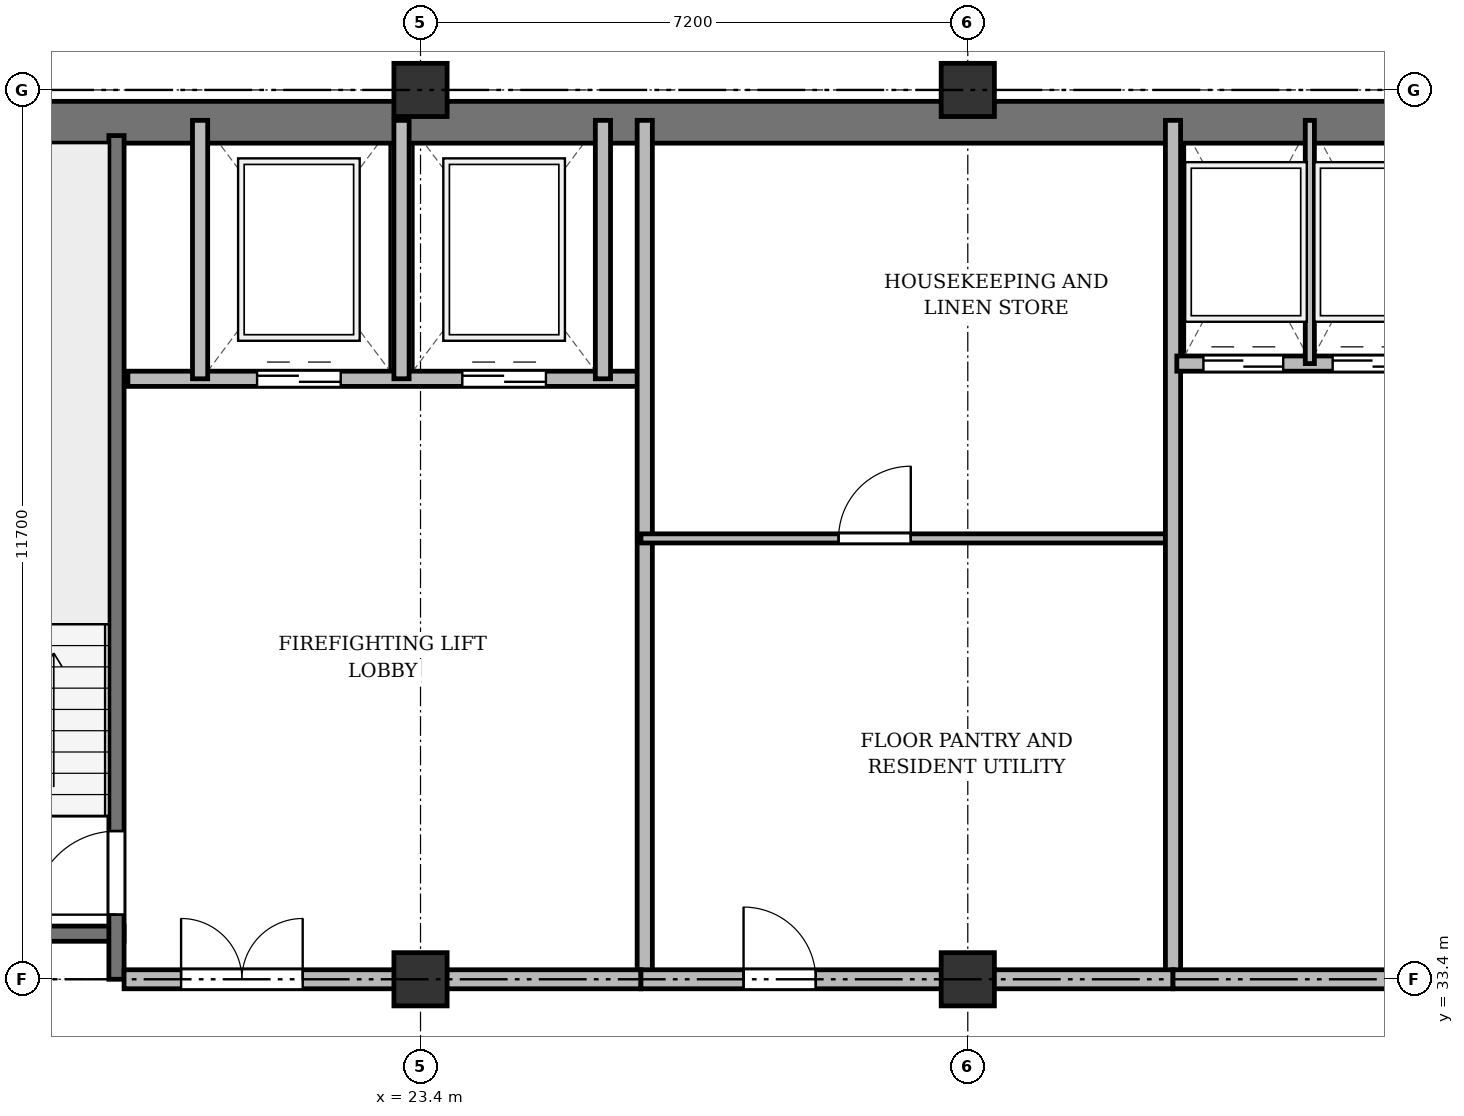
"""IFC4 building model, lengths in metres.
Left out: names, types, materials, properties, quantities, classifications, styles, units other than length and angle.
Written with IfcOpenShell. Run it as: python <this file> out.ifc"""

import sys

from ifc_helpers import new_model, si_unit, direction, frame, frame_2d, origin, origin_2d, place, context, subcontext, project, spatial, rectangle, extrude, source, transform, mapped, element, fill, save


model = new_model("IFC4")
c1 = context("Model", 3, precision=1e-05, world=origin(), true_north=direction((0.0, 1.0)))
c2 = subcontext(c1, "Body", "Model", "MODEL_VIEW")
j1 = project(units=[si_unit("LENGTHUNIT", "METRE"), si_unit("PLANEANGLEUNIT", "RADIAN")], contexts=[c1])
p1 = place(None, origin())
s1 = spatial("IfcSite", under=j1, at=p1, CompositionType="ELEMENT")
p2 = place(p1, origin())
s2 = spatial("IfcBuilding", under=s1, at=p2, CompositionType="ELEMENT")
p3 = place(p2, frame((0.0, 0.0, 204.9)))
s3 = spatial("IfcBuildingStorey", under=s2, at=p3, CompositionType="ELEMENT", Elevation=204.9)
m1 = source(origin(), c2, "Body", "SweptSolid", [
    extrude(rectangle(XDim=0.7, YDim=0.7, at=origin_2d()), origin(), (0.0, 0.0, 1.0), 3.6),
])
for number, where, z_axis, x_axis in (
    (1, (23.4, 33.4, 0.0), (0.0, 0.0, 1.0), (1.0, 0.0, 0.0)),
    (2, (23.4, 45.1, 0.0), (0.0, 0.0, 1.0), (1.0, 0.0, 0.0)),
    (3, (30.6, 33.4, 0.0), (0.0, 0.0, 1.0), (1.0, 0.0, 0.0)),
    (4, (30.6, 45.1, 0.0), (0.0, 0.0, 1.0), (1.0, 0.0, 0.0)),
):
    element("IfcColumn", number, at=place(p3, frame(where, z_axis=z_axis, x_axis=x_axis)), inside=s3, PredefinedType="COLUMN", context=c2, shape_type="MappedRepresentation", body=[
        mapped(m1, transform((0.0, 0.0, 0.0), x_axis=(1.0, 0.0, 0.0), y_axis=(0.0, 1.0, 0.0), z_axis=(0.0, 0.0, 1.0), scale=1.0)),
    ])
p4 = place(p3, frame((15.65, 44.675, 0.0), z_axis=(0.0, 0.0, 1.0), x_axis=(1.0, 0.0, 0.0)))
e5 = element("IfcWall", 5, at=p4, inside=s3, PredefinedType="SHEAR", context=c2, shape_type="SweptSolid", body=[
    extrude(rectangle(XDim=43.1, YDim=0.55, at=frame_2d((21.55, 0.0))), origin(), (0.0, 0.0, 1.0), 3.36),
])
p5 = place(p3, frame((16.1, 34.0, 0.0), z_axis=(0.0, 0.0, 1.0), x_axis=(1.0, 0.0, 0.0)))
e6 = element("IfcWall", 6, at=p5, inside=s3, PredefinedType="SHEAR", context=c2, shape_type="SweptSolid", body=[
    extrude(rectangle(XDim=3.4, YDim=0.2, at=frame_2d((1.7, 0.0))), origin(), (0.0, 0.0, 1.0), 3.36),
])
p6 = place(p3, frame((19.4, 33.4, 0.0), z_axis=(0.0, 0.0, 1.0), x_axis=(0.0, 1.0, 0.0)))
e7 = element("IfcWall", 7, at=p6, inside=s3, PredefinedType="SHEAR", context=c2, shape_type="SweptSolid", body=[
    extrude(rectangle(XDim=11.1, YDim=0.2, at=frame_2d((5.55, 0.0))), origin(), (0.0, 0.0, 1.0), 3.36),
])
p7 = place(p6, frame((0.85, 0.0, 0.0)))
e8 = element("IfcOpeningElement", 8, at=p7, cuts=e7, PredefinedType="OPENING", context=c2, shape_type="SweptSolid", body=[
    extrude(rectangle(XDim=1.1, YDim=2.15, at=frame_2d((0.55, 1.075))), frame((0.0, 0.11, 0.0), z_axis=(0.0, -1.0, 0.0), x_axis=(1.0, 0.0, 0.0)), (0.0, 0.0, 1.0), 0.22),
])
p8 = place(p3, frame((19.55, 41.3, 0.0), z_axis=(0.0, 0.0, 1.0), x_axis=(1.0, 0.0, 0.0)))
e9 = element("IfcWall", 9, at=p8, inside=s3, PredefinedType="SOLIDWALL", context=c2, shape_type="SweptSolid", body=[
    extrude(rectangle(XDim=6.75, YDim=0.2, at=frame_2d((3.375, 0.0))), origin(), (0.0, 0.0, 1.0), 3.36),
])
p9 = place(p8, frame((1.7, 0.0, 0.0)))
e10 = element("IfcOpeningElement", 10, at=p9, cuts=e9, PredefinedType="OPENING", context=c2, shape_type="SweptSolid", body=[
    extrude(rectangle(XDim=1.1, YDim=2.15, at=frame_2d((0.55, 1.075))), frame((0.0, 0.11, 0.0), z_axis=(0.0, -1.0, 0.0), x_axis=(1.0, 0.0, 0.0)), (0.0, 0.0, 1.0), 0.22),
])
p10 = place(p8, frame((4.4, 0.0, 0.0)))
e11 = element("IfcOpeningElement", 11, at=p10, cuts=e9, PredefinedType="OPENING", context=c2, shape_type="SweptSolid", body=[
    extrude(rectangle(XDim=1.1, YDim=2.15, at=frame_2d((0.55, 1.075))), frame((0.0, 0.11, 0.0), z_axis=(0.0, -1.0, 0.0), x_axis=(1.0, 0.0, 0.0)), (0.0, 0.0, 1.0), 0.22),
])
for number, where, z_axis, x_axis in (
    (12, (20.5, 41.3, 0.0), (0.0, 0.0, 1.0), (0.0, 1.0, 0.0)),
    (13, (23.15, 41.3, 0.0), (0.0, 0.0, 1.0), (0.0, 1.0, 0.0)),
    (14, (25.8, 41.3, 0.0), (0.0, 0.0, 1.0), (0.0, 1.0, 0.0)),
):
    element("IfcWall", number, at=place(p3, frame(where, z_axis=z_axis, x_axis=x_axis)), inside=s3, PredefinedType="SOLIDWALL", context=c2, shape_type="SweptSolid", body=[
        extrude(rectangle(XDim=3.4, YDim=0.2, at=frame_2d((1.7, 0.0))), origin(), (0.0, 0.0, 1.0), 3.36),
    ])
p11 = place(p3, frame((26.35, 33.4, 0.0), z_axis=(0.0, 0.0, 1.0), x_axis=(0.0, 1.0, 0.0)))
e15 = element("IfcWall", 15, at=p11, inside=s3, PredefinedType="SOLIDWALL", context=c2, shape_type="SweptSolid", body=[
    extrude(rectangle(XDim=11.3, YDim=0.2, at=frame_2d((5.65, 0.0))), origin(), (0.0, 0.0, 1.0), 2.91),
])
p12 = place(p3, frame((19.5, 33.4, 0.0), z_axis=(0.0, 0.0, 1.0), x_axis=(1.0, 0.0, 0.0)))
e16 = element("IfcWall", 16, at=p12, inside=s3, PredefinedType="PARTITIONING", context=c2, shape_type="SweptSolid", body=[
    extrude(rectangle(XDim=6.8, YDim=0.25, at=frame_2d((3.4, 0.0))), origin(), (0.0, 0.0, 1.0), 2.91),
])
p13 = place(p12, frame((0.75, 0.0, 0.0)))
e17 = element("IfcOpeningElement", 17, at=p13, cuts=e16, PredefinedType="OPENING", context=c2, shape_type="SweptSolid", body=[
    extrude(rectangle(XDim=1.6, YDim=2.2, at=frame_2d((0.8, 1.1))), frame((0.0, 0.135, 0.0), z_axis=(0.0, -1.0, 0.0), x_axis=(1.0, 0.0, 0.0)), (0.0, 0.0, 1.0), 0.27),
])
p14 = place(p3, frame((26.3, 39.2, 0.0), z_axis=(0.0, 0.0, 1.0), x_axis=(1.0, 0.0, 0.0)))
e18 = element("IfcWall", 18, at=p14, inside=s3, PredefinedType="PARTITIONING", context=c2, shape_type="SweptSolid", body=[
    extrude(rectangle(XDim=7.0, YDim=0.12, at=frame_2d((3.5, 0.0))), origin(), (0.0, 0.0, 1.0), 2.86),
])
p15 = place(p14, frame((2.6, 0.0, 0.0)))
e19 = element("IfcOpeningElement", 19, at=p15, cuts=e18, PredefinedType="OPENING", context=c2, shape_type="SweptSolid", body=[
    extrude(rectangle(XDim=0.95, YDim=2.15, at=frame_2d((0.475, 1.075))), frame((0.0, 0.07, 0.0), z_axis=(0.0, -1.0, 0.0), x_axis=(1.0, 0.0, 0.0)), (0.0, 0.0, 1.0), 0.14),
])
p16 = place(p3, frame((33.3, 33.4, 0.0), z_axis=(0.0, 0.0, 1.0), x_axis=(0.0, 1.0, 0.0)))
e20 = element("IfcWall", 20, at=p16, inside=s3, PredefinedType="SOLIDWALL", context=c2, shape_type="SweptSolid", body=[
    extrude(rectangle(XDim=11.3, YDim=0.2, at=frame_2d((5.65, 0.0))), origin(), (0.0, 0.0, 1.0), 2.91),
])
p17 = place(p3, frame((33.35, 41.5, 0.0), z_axis=(0.0, 0.0, 1.0), x_axis=(1.0, 0.0, 0.0)))
e21 = element("IfcWall", 21, at=p17, inside=s3, PredefinedType="SOLIDWALL", context=c2, shape_type="SweptSolid", body=[
    extrude(rectangle(XDim=6.9, YDim=0.2, at=frame_2d((3.45, 0.0))), origin(), (0.0, 0.0, 1.0), 3.36),
])
p18 = place(p17, frame((0.35, 0.0, 0.0)))
e22 = element("IfcOpeningElement", 22, at=p18, cuts=e21, PredefinedType="OPENING", context=c2, shape_type="SweptSolid", body=[
    extrude(rectangle(XDim=1.05, YDim=2.15, at=frame_2d((0.525, 1.075))), frame((0.0, 0.11, 0.0), z_axis=(0.0, -1.0, 0.0), x_axis=(1.0, 0.0, 0.0)), (0.0, 0.0, 1.0), 0.22),
])
p19 = place(p17, frame((2.05, 0.0, 0.0)))
e23 = element("IfcOpeningElement", 23, at=p19, cuts=e21, PredefinedType="OPENING", context=c2, shape_type="SweptSolid", body=[
    extrude(rectangle(XDim=1.05, YDim=2.15, at=frame_2d((0.525, 1.075))), frame((0.0, 0.11, 0.0), z_axis=(0.0, -1.0, 0.0), x_axis=(1.0, 0.0, 0.0)), (0.0, 0.0, 1.0), 0.22),
])
p20 = place(p17, frame((3.75, 0.0, 0.0)))
e24 = element("IfcOpeningElement", 24, at=p20, cuts=e21, PredefinedType="OPENING", context=c2, shape_type="SweptSolid", body=[
    extrude(rectangle(XDim=1.05, YDim=2.15, at=frame_2d((0.525, 1.075))), frame((0.0, 0.11, 0.0), z_axis=(0.0, -1.0, 0.0), x_axis=(1.0, 0.0, 0.0)), (0.0, 0.0, 1.0), 0.22),
])
p21 = place(p17, frame((5.45, 0.0, 0.0)))
e25 = element("IfcOpeningElement", 25, at=p21, cuts=e21, PredefinedType="OPENING", context=c2, shape_type="SweptSolid", body=[
    extrude(rectangle(XDim=1.05, YDim=2.15, at=frame_2d((0.525, 1.075))), frame((0.0, 0.11, 0.0), z_axis=(0.0, -1.0, 0.0), x_axis=(1.0, 0.0, 0.0)), (0.0, 0.0, 1.0), 0.22),
])
p22 = place(p3, frame((35.1, 41.5, 0.0), z_axis=(0.0, 0.0, 1.0), x_axis=(0.0, 1.0, 0.0)))
e26 = element("IfcWall", 26, at=p22, inside=s3, PredefinedType="PARTITIONING", context=c2, shape_type="SweptSolid", body=[
    extrude(rectangle(XDim=3.2, YDim=0.12, at=frame_2d((1.6, 0.0))), origin(), (0.0, 0.0, 1.0), 3.36),
])
p23 = place(p3, frame((26.3, 33.4, 0.0), z_axis=(0.0, 0.0, 1.0), x_axis=(1.0, 0.0, 0.0)))
e27 = element("IfcWall", 27, at=p23, inside=s3, PredefinedType="PARTITIONING", context=c2, shape_type="SweptSolid", body=[
    extrude(rectangle(XDim=7.0, YDim=0.25, at=frame_2d((3.5, 0.0))), origin(), (0.0, 0.0, 1.0), 2.91),
])
p24 = place(p23, frame((1.35, 0.0, 0.0)))
e28 = element("IfcOpeningElement", 28, at=p24, cuts=e27, PredefinedType="OPENING", context=c2, shape_type="SweptSolid", body=[
    extrude(rectangle(XDim=0.95, YDim=2.15, at=frame_2d((0.475, 1.075))), frame((0.0, 0.135, 0.0), z_axis=(0.0, -1.0, 0.0), x_axis=(1.0, 0.0, 0.0)), (0.0, 0.0, 1.0), 0.27),
])
p25 = place(p3, frame((33.3, 33.4, 0.0), z_axis=(0.0, 0.0, 1.0), x_axis=(1.0, 0.0, 0.0)))
e29 = element("IfcWall", 29, at=p25, inside=s3, PredefinedType="PARTITIONING", context=c2, shape_type="SweptSolid", body=[
    extrude(rectangle(XDim=13.85, YDim=0.25, at=frame_2d((6.925, 0.0))), origin(), (0.0, 0.0, 1.0), 2.91),
])
p26 = place(p25, frame((4.2, 0.0, 0.0)))
e30 = element("IfcOpeningElement", 30, at=p26, cuts=e29, PredefinedType="OPENING", context=c2, shape_type="SweptSolid", body=[
    extrude(rectangle(XDim=1.6, YDim=2.2, at=frame_2d((0.8, 1.1))), frame((0.0, 0.135, 0.0), z_axis=(0.0, -1.0, 0.0), x_axis=(1.0, 0.0, 0.0)), (0.0, 0.0, 1.0), 0.27),
])
m2 = source(origin(), c2, "Body", "SweptSolid", [
    extrude(rectangle(XDim=1.1, YDim=2.15, at=frame_2d((0.55, 1.075))), frame((0.0, 0.025, 0.0), z_axis=(0.0, -1.0, 0.0), x_axis=(1.0, 0.0, 0.0)), (0.0, 0.0, 1.0), 0.05),
])
p27 = place(p7, origin())
e31 = element("IfcDoor", 31, at=p27, inside=s3, OperationType="SINGLE_SWING_LEFT", PredefinedType="DOOR", context=c2, shape_type="MappedRepresentation", body=[
    mapped(m2, transform((0.0, 0.0, 0.0), x_axis=(1.0, 0.0, 0.0), y_axis=(0.0, 1.0, 0.0), z_axis=(0.0, 0.0, 1.0), scale=1.0)),
])
fill(e8, e31)
p28 = place(p9, origin())
e32 = element("IfcDoor", 32, at=p28, inside=s3, OperationType="DOUBLE_DOOR_SLIDING", PredefinedType="DOOR", context=c2, shape_type="MappedRepresentation", body=[
    mapped(m2, transform((0.0, 0.0, 0.0), x_axis=(1.0, 0.0, 0.0), y_axis=(0.0, 1.0, 0.0), z_axis=(0.0, 0.0, 1.0), scale=1.0)),
])
fill(e10, e32)
p29 = place(p10, origin())
e33 = element("IfcDoor", 33, at=p29, inside=s3, OperationType="DOUBLE_DOOR_SLIDING", PredefinedType="DOOR", context=c2, shape_type="MappedRepresentation", body=[
    mapped(m2, transform((0.0, 0.0, 0.0), x_axis=(1.0, 0.0, 0.0), y_axis=(0.0, 1.0, 0.0), z_axis=(0.0, 0.0, 1.0), scale=1.0)),
])
fill(e11, e33)
m3 = source(origin(), c2, "Body", "SweptSolid", [
    extrude(rectangle(XDim=1.6, YDim=2.2, at=frame_2d((0.8, 1.1))), frame((0.0, 0.025, 0.0), z_axis=(0.0, -1.0, 0.0), x_axis=(1.0, 0.0, 0.0)), (0.0, 0.0, 1.0), 0.05),
])
p30 = place(p13, origin())
e34 = element("IfcDoor", 34, at=p30, inside=s3, OperationType="DOUBLE_DOOR_SINGLE_SWING", PredefinedType="DOOR", context=c2, shape_type="MappedRepresentation", body=[
    mapped(m3, transform((0.0, 0.0, 0.0), x_axis=(1.0, 0.0, 0.0), y_axis=(0.0, 1.0, 0.0), z_axis=(0.0, 0.0, 1.0), scale=1.0)),
])
fill(e17, e34)
m4 = source(origin(), c2, "Body", "SweptSolid", [
    extrude(rectangle(XDim=0.95, YDim=2.15, at=frame_2d((0.475, 1.075))), frame((0.0, 0.025, 0.0), z_axis=(0.0, -1.0, 0.0), x_axis=(1.0, 0.0, 0.0)), (0.0, 0.0, 1.0), 0.05),
])
p31 = place(p15, origin())
e35 = element("IfcDoor", 35, at=p31, inside=s3, OperationType="SINGLE_SWING_RIGHT", PredefinedType="DOOR", context=c2, shape_type="MappedRepresentation", body=[
    mapped(m4, transform((0.0, 0.0, 0.0), x_axis=(1.0, 0.0, 0.0), y_axis=(0.0, 1.0, 0.0), z_axis=(0.0, 0.0, 1.0), scale=1.0)),
])
fill(e19, e35)
m5 = source(origin(), c2, "Body", "SweptSolid", [
    extrude(rectangle(XDim=1.05, YDim=2.15, at=frame_2d((0.525, 1.075))), frame((0.0, 0.025, 0.0), z_axis=(0.0, -1.0, 0.0), x_axis=(1.0, 0.0, 0.0)), (0.0, 0.0, 1.0), 0.05),
])
p32 = place(p18, origin())
e36 = element("IfcDoor", 36, at=p32, inside=s3, OperationType="DOUBLE_DOOR_SLIDING", PredefinedType="DOOR", context=c2, shape_type="MappedRepresentation", body=[
    mapped(m5, transform((0.0, 0.0, 0.0), x_axis=(1.0, 0.0, 0.0), y_axis=(0.0, 1.0, 0.0), z_axis=(0.0, 0.0, 1.0), scale=1.0)),
])
fill(e22, e36)
p33 = place(p19, origin())
e37 = element("IfcDoor", 37, at=p33, inside=s3, OperationType="DOUBLE_DOOR_SLIDING", PredefinedType="DOOR", context=c2, shape_type="MappedRepresentation", body=[
    mapped(m5, transform((0.0, 0.0, 0.0), x_axis=(1.0, 0.0, 0.0), y_axis=(0.0, 1.0, 0.0), z_axis=(0.0, 0.0, 1.0), scale=1.0)),
])
fill(e23, e37)
p34 = place(p24, origin())
e38 = element("IfcDoor", 38, at=p34, inside=s3, OperationType="SINGLE_SWING_LEFT", PredefinedType="DOOR", context=c2, shape_type="MappedRepresentation", body=[
    mapped(m4, transform((0.0, 0.0, 0.0), x_axis=(1.0, 0.0, 0.0), y_axis=(0.0, 1.0, 0.0), z_axis=(0.0, 0.0, 1.0), scale=1.0)),
])
fill(e28, e38)
save(model, sys.argv[1])
